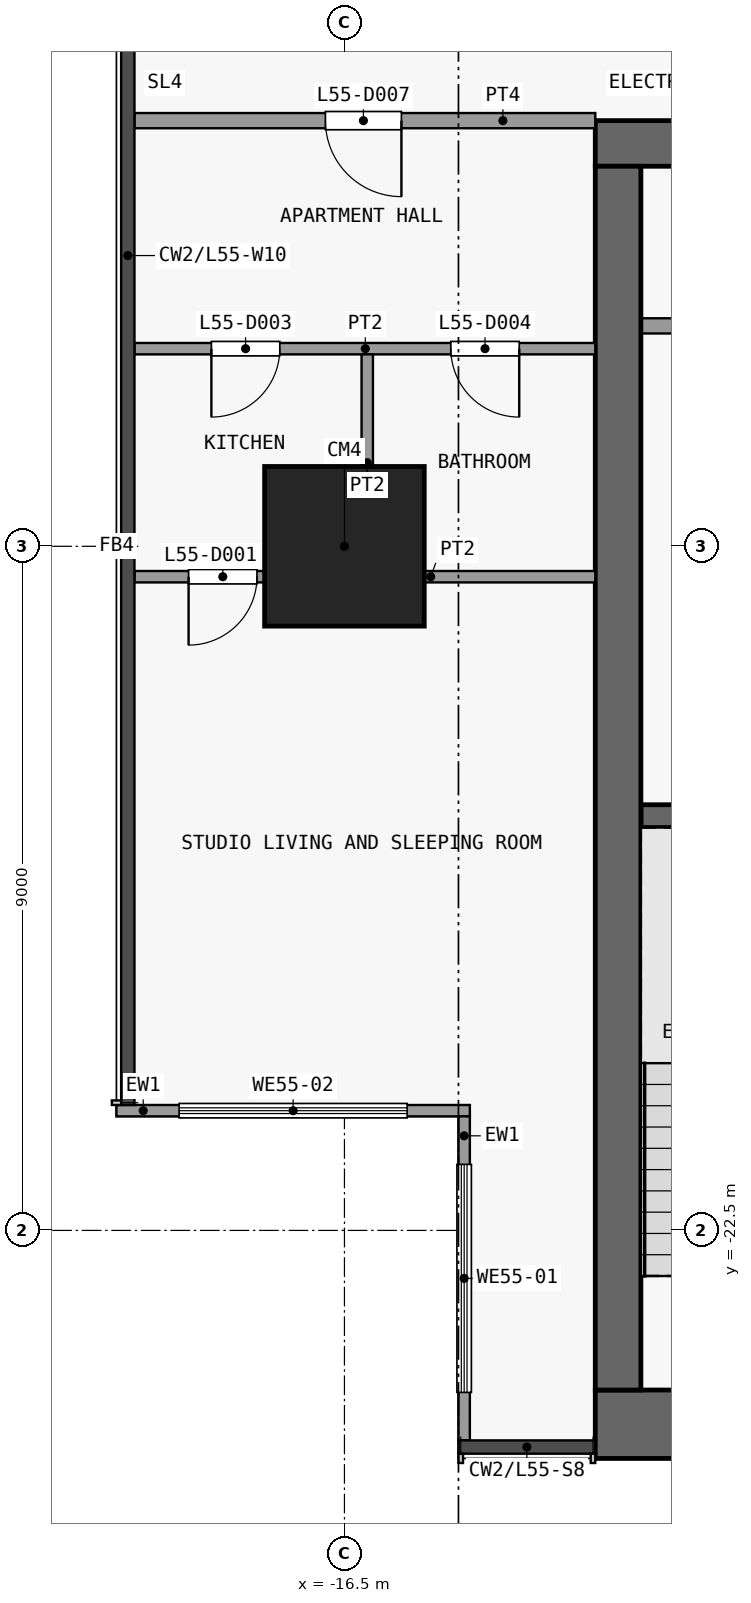
"""IFC4 building model, lengths in metres.
Left out: names, types, materials, properties, quantities, classifications, styles, units other than length and angle.
Written with IfcOpenShell. Run it as: python <this file> out.ifc"""

import sys

from ifc_helpers import new_model, si_unit, direction, frame, frame_2d, origin, origin_2d, place, context, subcontext, project, spatial, rectangle, extrude, element, fill, save


model = new_model("IFC4")
c1 = context("Model", 3, precision=1e-05, world=origin(), true_north=direction((0.0, 1.0)))
c2 = subcontext(c1, "Body", "Model", "MODEL_VIEW")
j1 = project(units=[si_unit("LENGTHUNIT", "METRE"), si_unit("PLANEANGLEUNIT", "RADIAN")], contexts=[c1])
p1 = place(None, origin())
s1 = spatial("IfcSite", under=j1, at=p1, CompositionType="ELEMENT")
p2 = place(p1, origin())
s2 = spatial("IfcBuilding", under=s1, at=p2, CompositionType="ELEMENT")
p3 = place(p2, frame((0.0, 0.0, 219.5)))
s3 = spatial("IfcBuildingStorey", under=s2, at=p3, CompositionType="ELEMENT", Elevation=219.5)
p4 = place(p3, frame((-16.5, -13.5, 0.0), z_axis=(0.0, 0.0, 1.0), x_axis=(1.0, 0.0, 0.0)))
e1 = element("IfcColumn", 1, at=p4, inside=s3, PredefinedType="COLUMN", context=c2, shape_type="SweptSolid", body=[
    extrude(rectangle(XDim=2.1, YDim=2.1, at=origin_2d()), origin(), (0.0, 0.0, 1.0), 3.6),
])
p5 = place(p3, frame((-13.2, -25.05, 0.0), z_axis=(0.0, 0.0, 1.0), x_axis=(1.0, 0.0, 0.0)))
e2 = element("IfcWall", 2, at=p5, inside=s3, PredefinedType="SHEAR", context=c2, shape_type="SweptSolid", body=[
    extrude(rectangle(XDim=26.4, YDim=0.9, at=frame_2d((13.2, 0.0))), origin(), (0.0, 0.0, 1.0), 3.3),
])
p6 = place(p3, frame((-13.2, -8.2, 0.0), z_axis=(0.0, 0.0, 1.0), x_axis=(1.0, 0.0, 0.0)))
e3 = element("IfcWall", 3, at=p6, inside=s3, PredefinedType="SHEAR", context=c2, shape_type="SweptSolid", body=[
    extrude(rectangle(XDim=26.4, YDim=0.6, at=frame_2d((13.2, 0.0))), origin(), (0.0, 0.0, 1.0), 3.3),
])
p7 = place(p6, frame((7.5, 0.0, 0.0)))
e4 = element("IfcOpeningElement", 4, at=p7, cuts=e3, PredefinedType="OPENING", context=c2, shape_type="SweptSolid", body=[
    extrude(rectangle(XDim=1.8, YDim=2.1, at=frame_2d((0.9, 1.05))), frame((0.0, 0.31, 0.0), z_axis=(0.0, -1.0, 0.0), x_axis=(1.0, 0.0, 0.0)), (0.0, 0.0, 1.0), 0.62),
])
p8 = place(p6, frame((17.1, 0.0, 0.0)))
e5 = element("IfcOpeningElement", 5, at=p8, cuts=e3, PredefinedType="OPENING", context=c2, shape_type="SweptSolid", body=[
    extrude(rectangle(XDim=1.8, YDim=2.1, at=frame_2d((0.9, 1.05))), frame((0.0, 0.31, 0.0), z_axis=(0.0, -1.0, 0.0), x_axis=(1.0, 0.0, 0.0)), (0.0, 0.0, 1.0), 0.62),
])
p9 = place(p6, frame((2.425, 0.0, 0.0)))
e6 = element("IfcOpeningElement", 6, at=p9, cuts=e3, PredefinedType="OPENING", context=c2, shape_type="SweptSolid", body=[
    extrude(rectangle(XDim=0.9, YDim=2.1, at=frame_2d((0.45, 1.05))), frame((0.0, 0.31, 0.0), z_axis=(0.0, -1.0, 0.0), x_axis=(1.0, 0.0, 0.0)), (0.0, 0.0, 1.0), 0.62),
])
p10 = place(p6, frame((23.075, 0.0, 0.0)))
e7 = element("IfcOpeningElement", 7, at=p10, cuts=e3, PredefinedType="OPENING", context=c2, shape_type="SweptSolid", body=[
    extrude(rectangle(XDim=0.9, YDim=2.1, at=frame_2d((0.45, 1.05))), frame((0.0, 0.31, 0.0), z_axis=(0.0, -1.0, 0.0), x_axis=(1.0, 0.0, 0.0)), (0.0, 0.0, 1.0), 0.62),
])
p11 = place(p3, frame((-12.9, -24.6, 0.0), z_axis=(0.0, 0.0, 1.0), x_axis=(0.0, 1.0, 0.0)))
e8 = element("IfcWall", 8, at=p11, inside=s3, PredefinedType="SHEAR", context=c2, shape_type="SweptSolid", body=[
    extrude(rectangle(XDim=16.1, YDim=0.6, at=frame_2d((8.05, 0.0))), origin(), (0.0, 0.0, 1.0), 3.3),
])
p12 = place(p3, frame((-12.6, -17.05, 0.0), z_axis=(0.0, 0.0, 1.0), x_axis=(1.0, 0.0, 0.0)))
e9 = element("IfcWall", 9, at=p12, inside=s3, PredefinedType="SHEAR", context=c2, shape_type="SweptSolid", body=[
    extrude(rectangle(XDim=3.1, YDim=0.3, at=frame_2d((1.55, 0.0))), origin(), (0.0, 0.0, 1.0), 3.3),
])
p13 = place(p3, frame((-12.6, -10.6, 0.0), z_axis=(0.0, 0.0, 1.0), x_axis=(1.0, 0.0, 0.0)))
e10 = element("IfcWall", 10, at=p13, inside=s3, PredefinedType="PARTITIONING", context=c2, shape_type="SweptSolid", body=[
    extrude(rectangle(XDim=1.45, YDim=0.2, at=frame_2d((0.725, 0.0))), origin(), (0.0, 0.0, 1.0), 3.3),
])
p14 = place(p3, frame((-14.925, -25.262, 0.0), z_axis=(0.0, 0.0, 1.0), x_axis=(0.0, 1.0, 0.0)))
e11 = element("IfcWall", 11, at=p14, inside=s3, PredefinedType="SOLIDWALL", context=c2, shape_type="SweptSolid", body=[
    extrude(rectangle(XDim=4.262, YDim=0.15, at=frame_2d((2.131, 0.0))), origin(), (0.0, 0.0, 1.0), 3.3),
])
p15 = place(p14, frame((0.631, 0.0, 0.9)))
e12 = element("IfcOpeningElement", 12, at=p15, cuts=e11, PredefinedType="OPENING", context=c2, shape_type="SweptSolid", body=[
    extrude(rectangle(XDim=3.0, YDim=2.4, at=frame_2d((1.5, 1.2))), frame((0.0, 0.085, 0.0), z_axis=(0.0, -1.0, 0.0), x_axis=(1.0, 0.0, 0.0)), (0.0, 0.0, 1.0), 0.17),
])
p16 = place(p3, frame((-14.85, -20.925, 0.0), z_axis=(0.0, 0.0, 1.0), x_axis=(-1.0, 0.0, 0.0)))
e13 = element("IfcWall", 13, at=p16, inside=s3, PredefinedType="SOLIDWALL", context=c2, shape_type="SweptSolid", body=[
    extrude(rectangle(XDim=4.65, YDim=0.15, at=frame_2d((2.325, 0.0))), origin(), (0.0, 0.0, 1.0), 3.3),
])
p17 = place(p16, frame((0.825, 0.0, 0.9)))
e14 = element("IfcOpeningElement", 14, at=p17, cuts=e13, PredefinedType="OPENING", context=c2, shape_type="SweptSolid", body=[
    extrude(rectangle(XDim=3.0, YDim=2.4, at=frame_2d((1.5, 1.2))), frame((0.0, 0.085, 0.0), z_axis=(0.0, -1.0, 0.0), x_axis=(1.0, 0.0, 0.0)), (0.0, 0.0, 1.0), 0.17),
])
p18 = place(p3, frame((-19.262, -13.9, 0.0), z_axis=(0.0, 0.0, 1.0), x_axis=(1.0, 0.0, 0.0)))
e15 = element("IfcWall", 15, at=p18, inside=s3, PredefinedType="PARTITIONING", context=c2, shape_type="SweptSolid", body=[
    extrude(rectangle(XDim=6.062, YDim=0.15, at=frame_2d((3.031, 0.0))), origin(), (0.0, 0.0, 1.0), 3.3),
])
p19 = place(p18, frame((0.712, 0.0, 0.0)))
e16 = element("IfcOpeningElement", 16, at=p19, cuts=e15, PredefinedType="OPENING", context=c2, shape_type="SweptSolid", body=[
    extrude(rectangle(XDim=0.9, YDim=2.1, at=frame_2d((0.45, 1.05))), frame((0.0, 0.085, 0.0), z_axis=(0.0, -1.0, 0.0), x_axis=(1.0, 0.0, 0.0)), (0.0, 0.0, 1.0), 0.17),
])
p20 = place(p3, frame((-19.262, -10.9, 0.0), z_axis=(0.0, 0.0, 1.0), x_axis=(1.0, 0.0, 0.0)))
e17 = element("IfcWall", 17, at=p20, inside=s3, PredefinedType="PARTITIONING", context=c2, shape_type="SweptSolid", body=[
    extrude(rectangle(XDim=6.062, YDim=0.15, at=frame_2d((3.031, 0.0))), origin(), (0.0, 0.0, 1.0), 3.3),
])
p21 = place(p20, frame((1.012, 0.0, 0.0)))
e18 = element("IfcOpeningElement", 18, at=p21, cuts=e17, PredefinedType="OPENING", context=c2, shape_type="SweptSolid", body=[
    extrude(rectangle(XDim=0.9, YDim=2.1, at=frame_2d((0.45, 1.05))), frame((0.0, 0.085, 0.0), z_axis=(0.0, -1.0, 0.0), x_axis=(1.0, 0.0, 0.0)), (0.0, 0.0, 1.0), 0.17),
])
p22 = place(p20, frame((4.162, 0.0, 0.0)))
e19 = element("IfcOpeningElement", 19, at=p22, cuts=e17, PredefinedType="OPENING", context=c2, shape_type="SweptSolid", body=[
    extrude(rectangle(XDim=0.9, YDim=2.1, at=frame_2d((0.45, 1.05))), frame((0.0, 0.085, 0.0), z_axis=(0.0, -1.0, 0.0), x_axis=(1.0, 0.0, 0.0)), (0.0, 0.0, 1.0), 0.17),
])
p23 = place(p3, frame((-19.262, -7.9, 0.0), z_axis=(0.0, 0.0, 1.0), x_axis=(1.0, 0.0, 0.0)))
e20 = element("IfcWall", 20, at=p23, inside=s3, PredefinedType="PARTITIONING", context=c2, shape_type="SweptSolid", body=[
    extrude(rectangle(XDim=6.062, YDim=0.2, at=frame_2d((3.031, 0.0))), origin(), (0.0, 0.0, 1.0), 3.3),
])
p24 = place(p23, frame((2.512, 0.0, 0.0)))
e21 = element("IfcOpeningElement", 21, at=p24, cuts=e20, PredefinedType="OPENING", context=c2, shape_type="SweptSolid", body=[
    extrude(rectangle(XDim=1.0, YDim=2.1, at=frame_2d((0.5, 1.05))), frame((0.0, 0.11, 0.0), z_axis=(0.0, -1.0, 0.0), x_axis=(1.0, 0.0, 0.0)), (0.0, 0.0, 1.0), 0.22),
])
p25 = place(p3, frame((-16.2, -13.825, 0.0), z_axis=(0.0, 0.0, 1.0), x_axis=(0.0, 1.0, 0.0)))
e22 = element("IfcWall", 22, at=p25, inside=s3, PredefinedType="PARTITIONING", context=c2, shape_type="SweptSolid", body=[
    extrude(rectangle(XDim=2.85, YDim=0.15, at=frame_2d((1.425, 0.0))), origin(), (0.0, 0.0, 1.0), 3.3),
])
p26 = place(p15, origin())
e23 = element("IfcWindow", 23, at=p26, inside=s3, PartitioningType="SINGLE_PANEL", PredefinedType="WINDOW", context=c2, shape_type="SweptSolid", body=[
    extrude(rectangle(XDim=3.0, YDim=2.4, at=frame_2d((1.5, 1.2))), frame((0.0, 0.03, 0.0), z_axis=(0.0, -1.0, 0.0), x_axis=(1.0, 0.0, 0.0)), (0.0, 0.0, 1.0), 0.06),
])
fill(e12, e23)
p27 = place(p17, origin())
e24 = element("IfcWindow", 24, at=p27, inside=s3, PartitioningType="SINGLE_PANEL", PredefinedType="WINDOW", context=c2, shape_type="SweptSolid", body=[
    extrude(rectangle(XDim=3.0, YDim=2.4, at=frame_2d((1.5, 1.2))), frame((0.0, 0.03, 0.0), z_axis=(0.0, -1.0, 0.0), x_axis=(1.0, 0.0, 0.0)), (0.0, 0.0, 1.0), 0.06),
])
fill(e14, e24)
p28 = place(p19, origin())
e25 = element("IfcDoor", 25, at=p28, inside=s3, OperationType="SINGLE_SWING_LEFT", PredefinedType="DOOR", context=c2, shape_type="SweptSolid", body=[
    extrude(rectangle(XDim=0.9, YDim=2.1, at=frame_2d((0.45, 1.05))), frame((0.0, 0.025, 0.0), z_axis=(0.0, -1.0, 0.0), x_axis=(1.0, 0.0, 0.0)), (0.0, 0.0, 1.0), 0.05),
])
fill(e16, e25)
p29 = place(p21, origin())
e26 = element("IfcDoor", 26, at=p29, inside=s3, OperationType="SINGLE_SWING_LEFT", PredefinedType="DOOR", context=c2, shape_type="SweptSolid", body=[
    extrude(rectangle(XDim=0.9, YDim=2.1, at=frame_2d((0.45, 1.05))), frame((0.0, 0.025, 0.0), z_axis=(0.0, -1.0, 0.0), x_axis=(1.0, 0.0, 0.0)), (0.0, 0.0, 1.0), 0.05),
])
fill(e18, e26)
p30 = place(p22, origin())
e27 = element("IfcDoor", 27, at=p30, inside=s3, OperationType="SINGLE_SWING_RIGHT", PredefinedType="DOOR", context=c2, shape_type="SweptSolid", body=[
    extrude(rectangle(XDim=0.9, YDim=2.1, at=frame_2d((0.45, 1.05))), frame((0.0, 0.025, 0.0), z_axis=(0.0, -1.0, 0.0), x_axis=(1.0, 0.0, 0.0)), (0.0, 0.0, 1.0), 0.05),
])
fill(e19, e27)
p31 = place(p24, origin())
e28 = element("IfcDoor", 28, at=p31, inside=s3, OperationType="SINGLE_SWING_RIGHT", PredefinedType="DOOR", context=c2, shape_type="SweptSolid", body=[
    extrude(rectangle(XDim=1.0, YDim=2.1, at=frame_2d((0.5, 1.05))), frame((0.0, 0.025, 0.0), z_axis=(0.0, -1.0, 0.0), x_axis=(1.0, 0.0, 0.0)), (0.0, 0.0, 1.0), 0.05),
])
fill(e21, e28)
save(model, sys.argv[1])
